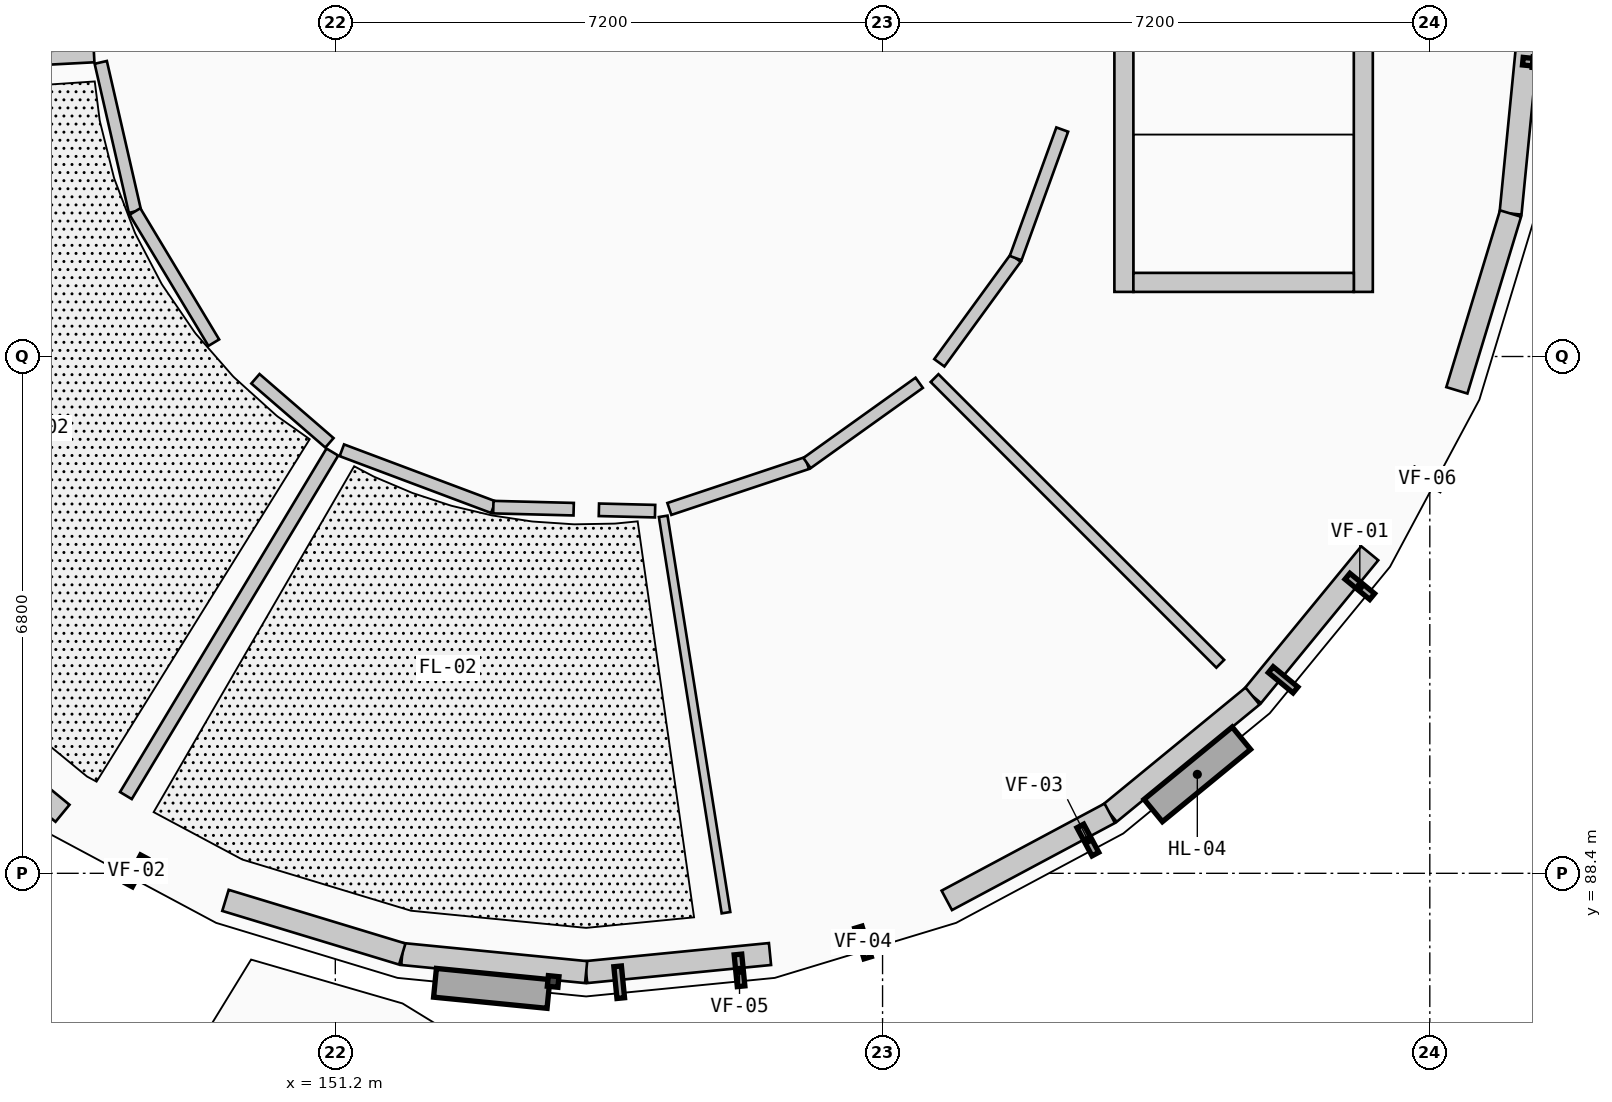
"""IFC4 building model, lengths in metres.
Left out: names, types, materials, properties, quantities, classifications, styles, units other than length and angle.
Written with IfcOpenShell. Run it as: python <this file> out.ifc"""

import sys

from ifc_helpers import new_model, si_unit, direction, frame, frame_2d, origin, origin_2d, place, context, subcontext, project, spatial, rectangle, circle, extrude, element, fill, save


model = new_model("IFC4")
c1 = context("Model", 3, precision=1e-05, world=origin(), true_north=direction((0.0, 1.0)))
c2 = subcontext(c1, "Body", "Model", "MODEL_VIEW")
j1 = project(units=[si_unit("LENGTHUNIT", "METRE"), si_unit("PLANEANGLEUNIT", "RADIAN")], contexts=[c1])
p1 = place(None, origin())
s1 = spatial("IfcSite", under=j1, at=p1, CompositionType="ELEMENT")
p2 = place(p1, origin())
s2 = spatial("IfcBuilding", under=s1, at=p2, CompositionType="ELEMENT")
p3 = place(p2, frame((0.0, 0.0, 4.55)))
s3 = spatial("IfcBuildingStorey", under=s2, at=p3, CompositionType="ELEMENT", Elevation=4.55)
for number, where, z_axis, x_axis in (
    (1, (149.954, 88.524, 0.0), (0.0, 0.0, 1.0), (1.0, 0.0, 0.0)),
    (2, (154.5, 87.62, 0.0), (0.0, 0.0, 1.0), (1.0, 0.0, 0.0)),
    (3, (159.046, 88.524, 0.0), (0.0, 0.0, 1.0), (1.0, 0.0, 0.0)),
    (4, (162.9, 91.1, 0.0), (0.0, 0.0, 1.0), (1.0, 0.0, 0.0)),
    (5, (165.476, 94.954, 0.0), (0.0, 0.0, 1.0), (1.0, 0.0, 0.0)),
    (6, (149.975, 94.975, 0.0), (0.0, 0.0, 1.0), (1.0, 0.0, 0.0)),
    (7, (154.5, 93.1, 0.0), (0.0, 0.0, 1.0), (1.0, 0.0, 0.0)),
    (8, (159.025, 94.975, 0.0), (0.0, 0.0, 1.0), (1.0, 0.0, 0.0)),
):
    element("IfcColumn", number, at=place(p3, frame(where, z_axis=z_axis, x_axis=x_axis)), inside=s3, PredefinedType="COLUMN", context=c2, shape_type="SweptSolid", body=[
        extrude(rectangle(XDim=0.365, YDim=0.365, at=origin_2d()), origin(), (0.0, 0.0, 1.0), 4.2),
    ])
p4 = place(p3, frame((150.488, 87.53, 0.0), z_axis=(0.0, 0.0, 1.0), x_axis=(1.0, 0.0, 0.0)))
e9 = element("IfcColumn", 9, at=p4, inside=s3, PredefinedType="PILASTER", context=c2, shape_type="SweptSolid", body=[
    extrude(circle(Radius=0.19, at=origin_2d()), origin(), (0.0, 0.0, 1.0), 4.2),
])
p5 = place(p3, frame((166.9, 99.5, 0.0), z_axis=(0.0, 0.0, 1.0), x_axis=(-0.097832820839, -0.995202863323, 0.0)))
e10 = element("IfcWall", 10, at=p5, inside=s3, PredefinedType="ELEMENTEDWALL", context=c2, shape_type="SweptSolid", body=[
    extrude(rectangle(XDim=2.431, YDim=0.29, at=frame_2d((1.215, 0.0))), origin(), (0.0, 0.0, 1.0), 3.309),
])
p6 = place(p3, frame((166.662, 97.081, 0.0), z_axis=(0.0, 0.0, 1.0), x_axis=(-0.290442193951, -0.956892539407, 0.0)))
e11 = element("IfcWall", 11, at=p6, inside=s3, PredefinedType="ELEMENTEDWALL", context=c2, shape_type="SweptSolid", body=[
    extrude(rectangle(XDim=2.431, YDim=0.29, at=frame_2d((1.215, 0.0))), origin(), (0.0, 0.0, 1.0), 3.309),
])
p7 = place(p6, frame((0.69, 0.0, 0.85)))
e12 = element("IfcOpeningElement", 12, at=p7, cuts=e11, PredefinedType="OPENING", context=c2, shape_type="SweptSolid", body=[
    extrude(rectangle(XDim=1.05, YDim=1.6, at=frame_2d((0.525, 0.8))), frame((0.0, 0.155, 0.0), z_axis=(0.0, -1.0, 0.0), x_axis=(1.0, 0.0, 0.0)), (0.0, 0.0, 1.0), 0.31),
])
p8 = place(p3, frame((164.81, 92.611, 0.0), z_axis=(0.0, 0.0, 1.0), x_axis=(-0.634347392822, -0.773048113134, 0.0)))
e13 = element("IfcWall", 13, at=p8, inside=s3, PredefinedType="ELEMENTEDWALL", context=c2, shape_type="SweptSolid", body=[
    extrude(rectangle(XDim=2.431, YDim=0.29, at=frame_2d((1.215, 0.0))), origin(), (0.0, 0.0, 1.0), 3.309),
])
p9 = place(p8, frame((0.69, 0.0, 0.85)))
e14 = element("IfcOpeningElement", 14, at=p9, cuts=e13, PredefinedType="OPENING", context=c2, shape_type="SweptSolid", body=[
    extrude(rectangle(XDim=1.05, YDim=1.9, at=frame_2d((0.525, 0.95))), frame((0.0, 0.155, 0.0), z_axis=(0.0, -1.0, 0.0), x_axis=(1.0, 0.0, 0.0)), (0.0, 0.0, 1.0), 0.31),
])
p10 = place(p3, frame((163.268, 90.732, 0.0), z_axis=(0.0, 0.0, 1.0), x_axis=(-0.773048113134, -0.634347392822, 0.0)))
e15 = element("IfcWall", 15, at=p10, inside=s3, PredefinedType="ELEMENTEDWALL", context=c2, shape_type="SweptSolid", body=[
    extrude(rectangle(XDim=2.431, YDim=0.29, at=frame_2d((1.215, 0.0))), origin(), (0.0, 0.0, 1.0), 3.309),
])
p11 = place(p10, frame((0.69, 0.0, 0.85)))
e16 = element("IfcOpeningElement", 16, at=p11, cuts=e15, PredefinedType="OPENING", context=c2, shape_type="SweptSolid", body=[
    extrude(rectangle(XDim=1.05, YDim=2.15, at=frame_2d((0.525, 1.075))), frame((0.0, 0.155, 0.0), z_axis=(0.0, -1.0, 0.0), x_axis=(1.0, 0.0, 0.0)), (0.0, 0.0, 1.0), 0.31),
])
p12 = place(p3, frame((161.389, 89.19, 0.0), z_axis=(0.0, 0.0, 1.0), x_axis=(-0.881902152415, -0.471432490996, 0.0)))
e17 = element("IfcWall", 17, at=p12, inside=s3, PredefinedType="ELEMENTEDWALL", context=c2, shape_type="SweptSolid", body=[
    extrude(rectangle(XDim=2.431, YDim=0.29, at=frame_2d((1.215, 0.0))), origin(), (0.0, 0.0, 1.0), 3.309),
])
p13 = place(p12, frame((0.676, 0.0, 0.85)))
e18 = element("IfcOpeningElement", 18, at=p13, cuts=e17, PredefinedType="OPENING", context=c2, shape_type="SweptSolid", body=[
    extrude(rectangle(XDim=1.08, YDim=1.5, at=frame_2d((0.54, 0.75))), frame((0.0, 0.155, 0.0), z_axis=(0.0, -1.0, 0.0), x_axis=(1.0, 0.0, 0.0)), (0.0, 0.0, 1.0), 0.31),
])
p14 = place(p3, frame((156.919, 87.338, 0.0), z_axis=(0.0, 0.0, 1.0), x_axis=(-0.995202863323, -0.097832820839, 0.0)))
e19 = element("IfcWall", 19, at=p14, inside=s3, PredefinedType="ELEMENTEDWALL", context=c2, shape_type="SweptSolid", body=[
    extrude(rectangle(XDim=2.431, YDim=0.29, at=frame_2d((1.215, 0.0))), origin(), (0.0, 0.0, 1.0), 3.309),
])
p15 = place(p14, frame((0.675, 0.0, 0.85)))
e20 = element("IfcOpeningElement", 20, at=p15, cuts=e19, PredefinedType="OPENING", context=c2, shape_type="SweptSolid", body=[
    extrude(rectangle(XDim=1.08, YDim=1.8, at=frame_2d((0.54, 0.9))), frame((0.0, 0.155, 0.0), z_axis=(0.0, -1.0, 0.0), x_axis=(1.0, 0.0, 0.0)), (0.0, 0.0, 1.0), 0.31),
])
p16 = place(p3, frame((154.5, 87.1, 0.0), z_axis=(0.0, 0.0, 1.0), x_axis=(-0.995202863323, 0.097832820839, 0.0)))
e21 = element("IfcWall", 21, at=p16, inside=s3, PredefinedType="ELEMENTEDWALL", context=c2, shape_type="SweptSolid", body=[
    extrude(rectangle(XDim=2.431, YDim=0.29, at=frame_2d((1.215, 0.0))), origin(), (0.0, 0.0, 1.0), 3.309),
])
p17 = place(p16, frame((0.665, 0.0, 0.85)))
e22 = element("IfcOpeningElement", 22, at=p17, cuts=e21, PredefinedType="OPENING", context=c2, shape_type="SweptSolid", body=[
    extrude(rectangle(XDim=1.1, YDim=1.25, at=frame_2d((0.55, 0.625))), frame((0.0, 0.155, 0.0), z_axis=(0.0, -1.0, 0.0), x_axis=(1.0, 0.0, 0.0)), (0.0, 0.0, 1.0), 0.31),
])
p18 = place(p3, frame((152.081, 87.338, 0.0), z_axis=(0.0, 0.0, 1.0), x_axis=(-0.956892539407, 0.290442193951, 0.0)))
e23 = element("IfcWall", 23, at=p18, inside=s3, PredefinedType="ELEMENTEDWALL", context=c2, shape_type="SweptSolid", body=[
    extrude(rectangle(XDim=2.431, YDim=0.29, at=frame_2d((1.215, 0.0))), origin(), (0.0, 0.0, 1.0), 3.309),
])
p19 = place(p3, frame((147.611, 89.19, 0.0), z_axis=(0.0, 0.0, 1.0), x_axis=(-0.773048113134, 0.634347392822, 0.0)))
e24 = element("IfcWall", 24, at=p19, inside=s3, PredefinedType="ELEMENTEDWALL", context=c2, shape_type="SweptSolid", body=[
    extrude(rectangle(XDim=2.431, YDim=0.29, at=frame_2d((1.215, 0.0))), origin(), (0.0, 0.0, 1.0), 3.309),
])
p20 = place(p19, frame((0.665, 0.0, 0.85)))
e25 = element("IfcOpeningElement", 25, at=p20, cuts=e24, PredefinedType="OPENING", context=c2, shape_type="SweptSolid", body=[
    extrude(rectangle(XDim=1.1, YDim=1.5, at=frame_2d((0.55, 0.75))), frame((0.0, 0.155, 0.0), z_axis=(0.0, -1.0, 0.0), x_axis=(1.0, 0.0, 0.0)), (0.0, 0.0, 1.0), 0.31),
])
p21 = place(p3, frame((161.575, 102.95, 0.0), z_axis=(0.0, 0.0, 1.0), x_axis=(0.0, -1.0, 0.0)))
e26 = element("IfcWall", 26, at=p21, inside=s3, PredefinedType="SHEAR", context=c2, shape_type="SweptSolid", body=[
    extrude(rectangle(XDim=6.9, YDim=0.25, at=frame_2d((3.45, 0.0))), origin(), (0.0, 0.0, 1.0), 3.955),
])
p22 = place(p21, frame((0.43, 0.0, 0.0)))
e27 = element("IfcOpeningElement", 27, at=p22, cuts=e26, PredefinedType="OPENING", context=c2, shape_type="SweptSolid", body=[
    extrude(rectangle(XDim=1.1, YDim=2.15, at=frame_2d((0.55, 1.075))), frame((0.0, 0.135, 0.0), z_axis=(0.0, -1.0, 0.0), x_axis=(1.0, 0.0, 0.0)), (0.0, 0.0, 1.0), 0.27),
])
p23 = place(p3, frame((164.725, 102.95, 0.0), z_axis=(0.0, 0.0, 1.0), x_axis=(0.0, -1.0, 0.0)))
e28 = element("IfcWall", 28, at=p23, inside=s3, PredefinedType="SHEAR", context=c2, shape_type="SweptSolid", body=[
    extrude(rectangle(XDim=6.9, YDim=0.25, at=frame_2d((3.45, 0.0))), origin(), (0.0, 0.0, 1.0), 3.955),
])
p24 = place(p3, frame((161.7, 96.175, 0.0), z_axis=(0.0, 0.0, 1.0), x_axis=(1.0, 0.0, 0.0)))
e29 = element("IfcWall", 29, at=p24, inside=s3, PredefinedType="SHEAR", context=c2, shape_type="SweptSolid", body=[
    extrude(rectangle(XDim=2.9, YDim=0.25, at=frame_2d((1.45, 0.0))), origin(), (0.0, 0.0, 1.0), 3.955),
])
p25 = place(p3, frame((148.026, 99.161, 0.0), z_axis=(0.0, 0.0, 1.0), x_axis=(-0.998629447921, -0.052337613105, 0.0)))
e30 = element("IfcWall", 30, at=p25, inside=s3, PredefinedType="PARTITIONING", context=c2, shape_type="SweptSolid", body=[
    extrude(rectangle(XDim=5.271, YDim=0.18, at=frame_2d((2.636, 0.0))), origin(), (0.0, 0.0, 1.0), 3.284),
])
p26 = place(p3, frame((151.161, 93.943, 0.0), z_axis=(0.0, 0.0, 1.0), x_axis=(-0.515026730069, -0.857174117268, 0.0)))
e31 = element("IfcWall", 31, at=p26, inside=s3, PredefinedType="PARTITIONING", context=c2, shape_type="SweptSolid", body=[
    extrude(rectangle(XDim=5.273, YDim=0.18, at=frame_2d((2.637, 0.0))), origin(), (0.0, 0.0, 1.0), 3.284),
])
p27 = place(p3, frame((155.514, 93.097, 0.0), z_axis=(0.0, 0.0, 1.0), x_axis=(0.156475439167, -0.98768185006, 0.0)))
e32 = element("IfcWall", 32, at=p27, inside=s3, PredefinedType="PARTITIONING", context=c2, shape_type="SweptSolid", body=[
    extrude(rectangle(XDim=5.28, YDim=0.115, at=frame_2d((2.64, 0.0))), origin(), (0.0, 0.0, 1.0), 3.284),
])
p28 = place(p3, frame((159.084, 94.916, 0.0), z_axis=(0.0, 0.0, 1.0), x_axis=(0.707106781187, -0.707106781187, 0.0)))
e33 = element("IfcWall", 33, at=p28, inside=s3, PredefinedType="PARTITIONING", context=c2, shape_type="SweptSolid", body=[
    extrude(rectangle(XDim=5.316, YDim=0.145, at=frame_2d((2.658, 0.0))), origin(), (0.0, 0.0, 1.0), 3.284),
])
p29 = place(p3, frame((148.114, 99.07, 0.0), z_axis=(0.0, 0.0, 1.0), x_axis=(0.223512984269, -0.974700952017, 0.0)))
e34 = element("IfcWall", 34, at=p29, inside=s3, PredefinedType="PARTITIONING", context=c2, shape_type="SweptSolid", body=[
    extrude(rectangle(XDim=2.013, YDim=0.165, at=frame_2d((1.007, 0.0))), origin(), (0.0, 0.0, 1.0), 3.284),
])
p30 = place(p29, frame((0.257, 0.0, 0.0)))
e35 = element("IfcOpeningElement", 35, at=p30, cuts=e34, PredefinedType="OPENING", context=c2, shape_type="SweptSolid", body=[
    extrude(rectangle(XDim=1.5, YDim=2.3, at=frame_2d((0.75, 1.15))), frame((0.0, 0.093, 0.0), z_axis=(0.0, -1.0, 0.0), x_axis=(1.0, 0.0, 0.0)), (0.0, 0.0, 1.0), 0.185),
])
p31 = place(p3, frame((148.564, 97.108, 0.0), z_axis=(0.0, 0.0, 1.0), x_axis=(0.515084069478, -0.857139662698, 0.0)))
e36 = element("IfcWall", 36, at=p31, inside=s3, PredefinedType="PARTITIONING", context=c2, shape_type="SweptSolid", body=[
    extrude(rectangle(XDim=2.013, YDim=0.165, at=frame_2d((1.007, 0.0))), origin(), (0.0, 0.0, 1.0), 3.284),
])
p32 = place(p3, frame((150.149, 94.907, 0.0), z_axis=(0.0, 0.0, 1.0), x_axis=(0.756157862191, -0.654389247655, 0.0)))
e37 = element("IfcWall", 37, at=p32, inside=s3, PredefinedType="PARTITIONING", context=c2, shape_type="SweptSolid", body=[
    extrude(rectangle(XDim=1.288, YDim=0.165, at=frame_2d((0.644, 0.0))), origin(), (0.0, 0.0, 1.0), 3.284),
])
p33 = place(p3, frame((151.286, 93.966, 0.0), z_axis=(0.0, 0.0, 1.0), x_axis=(0.93623488757, -0.35137477897, 0.0)))
e38 = element("IfcWall", 38, at=p33, inside=s3, PredefinedType="PARTITIONING", context=c2, shape_type="SweptSolid", body=[
    extrude(rectangle(XDim=2.129, YDim=0.165, at=frame_2d((1.064, 0.0))), origin(), (0.0, 0.0, 1.0), 3.284),
])
p34 = place(p33, frame((0.365, 0.0, 0.0)))
e39 = element("IfcOpeningElement", 39, at=p34, cuts=e38, PredefinedType="OPENING", context=c2, shape_type="SweptSolid", body=[
    extrude(rectangle(XDim=1.4, YDim=2.25, at=frame_2d((0.7, 1.125))), frame((0.0, 0.093, 0.0), z_axis=(0.0, -1.0, 0.0), x_axis=(1.0, 0.0, 0.0)), (0.0, 0.0, 1.0), 0.185),
])
p35 = place(p3, frame((153.279, 93.218, 0.0), z_axis=(0.0, 0.0, 1.0), x_axis=(0.999671430909, -0.025632600793, 0.0)))
e40 = element("IfcWall", 40, at=p35, inside=s3, PredefinedType="PARTITIONING", context=c2, shape_type="SweptSolid", body=[
    extrude(rectangle(XDim=1.057, YDim=0.165, at=frame_2d((0.529, 0.0))), origin(), (0.0, 0.0, 1.0), 3.284),
])
p36 = place(p3, frame((154.668, 93.183, 0.0), z_axis=(0.0, 0.0, 1.0), x_axis=(0.999701314602, -0.024439344989, 0.0)))
e41 = element("IfcWall", 41, at=p36, inside=s3, PredefinedType="PARTITIONING", context=c2, shape_type="SweptSolid", body=[
    extrude(rectangle(XDim=0.739, YDim=0.165, at=frame_2d((0.37, 0.0))), origin(), (0.0, 0.0, 1.0), 3.284),
])
p37 = place(p3, frame((155.595, 93.194, 0.0), z_axis=(0.0, 0.0, 1.0), x_axis=(0.948632132652, 0.316381220839, 0.0)))
e42 = element("IfcWall", 42, at=p37, inside=s3, PredefinedType="PARTITIONING", context=c2, shape_type="SweptSolid", body=[
    extrude(rectangle(XDim=1.909, YDim=0.165, at=frame_2d((0.955, 0.0))), origin(), (0.0, 0.0, 1.0), 3.284),
])
p38 = place(p37, frame((0.514, 0.0, 0.0)))
e43 = element("IfcOpeningElement", 43, at=p38, cuts=e42, PredefinedType="OPENING", context=c2, shape_type="SweptSolid", body=[
    extrude(rectangle(XDim=0.88, YDim=2.1, at=frame_2d((0.44, 1.05))), frame((0.0, 0.093, 0.0), z_axis=(0.0, -1.0, 0.0), x_axis=(1.0, 0.0, 0.0)), (0.0, 0.0, 1.0), 0.185),
])
p39 = place(p3, frame((157.406, 93.798, 0.0), z_axis=(0.0, 0.0, 1.0), x_axis=(0.813324248, 0.581810680218, 0.0)))
e44 = element("IfcWall", 44, at=p39, inside=s3, PredefinedType="PARTITIONING", context=c2, shape_type="SweptSolid", body=[
    extrude(rectangle(XDim=1.815, YDim=0.165, at=frame_2d((0.907, 0.0))), origin(), (0.0, 0.0, 1.0), 3.284),
])
p40 = place(p3, frame((159.147, 95.117, 0.0), z_axis=(0.0, 0.0, 1.0), x_axis=(0.588784523438, 0.808290037647, 0.0)))
e45 = element("IfcWall", 45, at=p40, inside=s3, PredefinedType="PARTITIONING", context=c2, shape_type="SweptSolid", body=[
    extrude(rectangle(XDim=1.705, YDim=0.165, at=frame_2d((0.853, 0.0))), origin(), (0.0, 0.0, 1.0), 3.284),
])
p41 = place(p40, frame((0.298, 0.0, 0.0)))
e46 = element("IfcOpeningElement", 46, at=p41, cuts=e45, PredefinedType="OPENING", context=c2, shape_type="SweptSolid", body=[
    extrude(rectangle(XDim=1.11, YDim=2.25, at=frame_2d((0.555, 1.125))), frame((0.0, 0.093, 0.0), z_axis=(0.0, -1.0, 0.0), x_axis=(1.0, 0.0, 0.0)), (0.0, 0.0, 1.0), 0.185),
])
p42 = place(p3, frame((160.151, 96.495, 0.0), z_axis=(0.0, 0.0, 1.0), x_axis=(0.340838314518, 0.940121930048, 0.0)))
e47 = element("IfcWall", 47, at=p42, inside=s3, PredefinedType="PARTITIONING", context=c2, shape_type="SweptSolid", body=[
    extrude(rectangle(XDim=1.799, YDim=0.165, at=frame_2d((0.899, 0.0))), origin(), (0.0, 0.0, 1.0), 3.284),
])
p43 = place(p7, origin())
e48 = element("IfcWindow", 48, at=p43, inside=s3, PartitioningType="SINGLE_PANEL", PredefinedType="WINDOW", context=c2, shape_type="SweptSolid", body=[
    extrude(rectangle(XDim=1.05, YDim=1.6, at=frame_2d((0.525, 0.8))), frame((0.0, 0.03, 0.0), z_axis=(0.0, -1.0, 0.0), x_axis=(1.0, 0.0, 0.0)), (0.0, 0.0, 1.0), 0.06),
])
fill(e12, e48)
p44 = place(p9, origin())
e49 = element("IfcWindow", 49, at=p44, inside=s3, PartitioningType="SINGLE_PANEL", PredefinedType="WINDOW", context=c2, shape_type="SweptSolid", body=[
    extrude(rectangle(XDim=1.05, YDim=1.9, at=frame_2d((0.525, 0.95))), frame((0.0, 0.03, 0.0), z_axis=(0.0, -1.0, 0.0), x_axis=(1.0, 0.0, 0.0)), (0.0, 0.0, 1.0), 0.06),
])
fill(e14, e49)
p45 = place(p11, origin())
e50 = element("IfcWindow", 50, at=p45, inside=s3, PartitioningType="SINGLE_PANEL", PredefinedType="WINDOW", context=c2, shape_type="SweptSolid", body=[
    extrude(rectangle(XDim=1.05, YDim=2.15, at=frame_2d((0.525, 1.075))), frame((0.0, 0.03, 0.0), z_axis=(0.0, -1.0, 0.0), x_axis=(1.0, 0.0, 0.0)), (0.0, 0.0, 1.0), 0.06),
])
fill(e16, e50)
p46 = place(p13, origin())
e51 = element("IfcWindow", 51, at=p46, inside=s3, PartitioningType="SINGLE_PANEL", PredefinedType="WINDOW", context=c2, shape_type="SweptSolid", body=[
    extrude(rectangle(XDim=1.08, YDim=1.5, at=frame_2d((0.54, 0.75))), frame((0.0, 0.03, 0.0), z_axis=(0.0, -1.0, 0.0), x_axis=(1.0, 0.0, 0.0)), (0.0, 0.0, 1.0), 0.06),
])
fill(e18, e51)
p47 = place(p15, origin())
e52 = element("IfcWindow", 52, at=p47, inside=s3, PartitioningType="SINGLE_PANEL", PredefinedType="WINDOW", context=c2, shape_type="SweptSolid", body=[
    extrude(rectangle(XDim=1.08, YDim=1.8, at=frame_2d((0.54, 0.9))), frame((0.0, 0.03, 0.0), z_axis=(0.0, -1.0, 0.0), x_axis=(1.0, 0.0, 0.0)), (0.0, 0.0, 1.0), 0.06),
])
fill(e20, e52)
p48 = place(p17, origin())
e53 = element("IfcWindow", 53, at=p48, inside=s3, PartitioningType="SINGLE_PANEL", PredefinedType="WINDOW", context=c2, shape_type="SweptSolid", body=[
    extrude(rectangle(XDim=1.1, YDim=1.25, at=frame_2d((0.55, 0.625))), frame((0.0, 0.03, 0.0), z_axis=(0.0, -1.0, 0.0), x_axis=(1.0, 0.0, 0.0)), (0.0, 0.0, 1.0), 0.06),
])
fill(e22, e53)
p49 = place(p30, origin())
e54 = element("IfcDoor", 54, at=p49, inside=s3, OperationType="SINGLE_SWING_LEFT", PredefinedType="DOOR", context=c2, shape_type="SweptSolid", body=[
    extrude(rectangle(XDim=1.5, YDim=2.3, at=frame_2d((0.75, 1.15))), frame((0.0, 0.025, 0.0), z_axis=(0.0, -1.0, 0.0), x_axis=(1.0, 0.0, 0.0)), (0.0, 0.0, 1.0), 0.05),
])
fill(e35, e54)
p50 = place(p34, origin())
e55 = element("IfcDoor", 55, at=p50, inside=s3, OperationType="SINGLE_SWING_RIGHT", PredefinedType="DOOR", context=c2, shape_type="SweptSolid", body=[
    extrude(rectangle(XDim=1.4, YDim=2.25, at=frame_2d((0.7, 1.125))), frame((0.0, 0.025, 0.0), z_axis=(0.0, -1.0, 0.0), x_axis=(1.0, 0.0, 0.0)), (0.0, 0.0, 1.0), 0.05),
])
fill(e39, e55)
p51 = place(p38, origin())
e56 = element("IfcDoor", 56, at=p51, inside=s3, OperationType="SINGLE_SWING_LEFT", PredefinedType="DOOR", context=c2, shape_type="SweptSolid", body=[
    extrude(rectangle(XDim=0.88, YDim=2.1, at=frame_2d((0.44, 1.05))), frame((0.0, 0.025, 0.0), z_axis=(0.0, -1.0, 0.0), x_axis=(1.0, 0.0, 0.0)), (0.0, 0.0, 1.0), 0.05),
])
fill(e43, e56)
p52 = place(p41, origin())
e57 = element("IfcDoor", 57, at=p52, inside=s3, OperationType="SINGLE_SWING_RIGHT", PredefinedType="DOOR", context=c2, shape_type="SweptSolid", body=[
    extrude(rectangle(XDim=1.11, YDim=2.25, at=frame_2d((0.555, 1.125))), frame((0.0, 0.025, 0.0), z_axis=(0.0, -1.0, 0.0), x_axis=(1.0, 0.0, 0.0)), (0.0, 0.0, 1.0), 0.05),
])
fill(e46, e57)
save(model, sys.argv[1])
